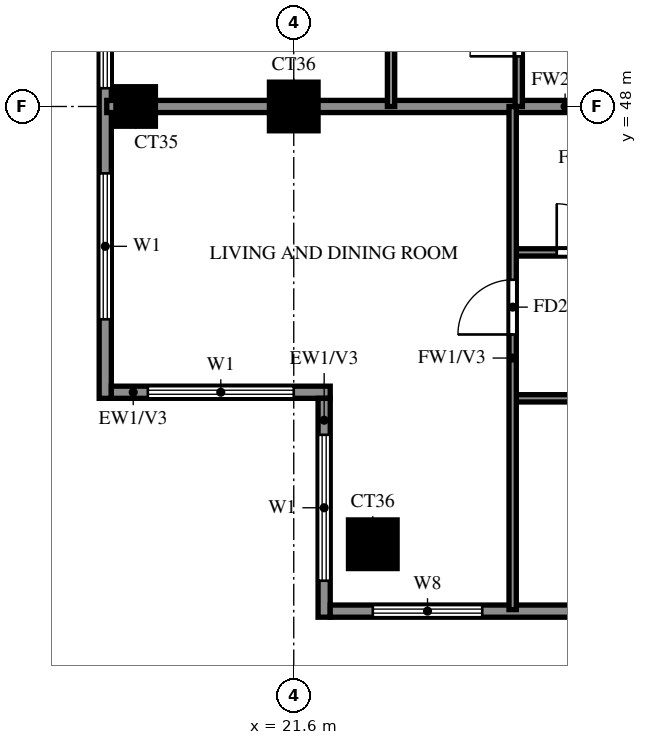
"""IFC4 building model, lengths in metres.
Left out: names, types, materials, properties, quantities, classifications, styles, units other than length and angle.
Written with IfcOpenShell. Run it as: python <this file> out.ifc"""

import sys

from ifc_helpers import new_model, si_unit, direction, frame, frame_2d, origin, origin_2d, place, context, subcontext, project, spatial, rectangle, extrude, source, transform, mapped, element, fill, save


model = new_model("IFC4")
c1 = context("Model", 3, precision=1e-05, world=origin(), true_north=direction((0.0, 1.0)))
c2 = subcontext(c1, "Body", "Model", "MODEL_VIEW")
j1 = project(units=[si_unit("LENGTHUNIT", "METRE"), si_unit("PLANEANGLEUNIT", "RADIAN")], contexts=[c1])
p1 = place(None, origin())
s1 = spatial("IfcSite", under=j1, at=p1, CompositionType="ELEMENT")
p2 = place(p1, origin())
s2 = spatial("IfcBuilding", under=s1, at=p2, CompositionType="ELEMENT")
p3 = place(p2, frame((0.0, 0.0, 243.0)))
s3 = spatial("IfcBuildingStorey", under=s2, at=p3, CompositionType="ELEMENT", Elevation=243.0)
m1 = source(origin(), c2, "Body", "SweptSolid", [
    extrude(rectangle(XDim=0.8, YDim=0.8, at=origin_2d()), origin(), (0.0, 0.0, 1.0), 3.22),
])
p4 = place(p3, frame((22.9, 40.8, 0.0), z_axis=(0.0, 0.0, 1.0), x_axis=(1.0, 0.0, 0.0)))
e1 = element("IfcColumn", 1, at=p4, inside=s3, PredefinedType="COLUMN", context=c2, shape_type="MappedRepresentation", body=[
    mapped(m1, transform((0.0, 0.0, 0.0))),
])
m2 = source(origin(), c2, "Body", "SweptSolid", [
    extrude(rectangle(XDim=0.65, YDim=0.65, at=origin_2d()), origin(), (0.0, 0.0, 1.0), 3.22),
])
p5 = place(p3, frame((19.0, 48.0, 0.0), z_axis=(0.0, 0.0, 1.0), x_axis=(1.0, 0.0, 0.0)))
e2 = element("IfcColumn", 2, at=p5, inside=s3, PredefinedType="COLUMN", context=c2, shape_type="MappedRepresentation", body=[
    mapped(m2, transform((0.0, 0.0, 0.0))),
])
p6 = place(p3, frame((21.6, 48.0, 0.0), z_axis=(0.0, 0.0, 1.0), x_axis=(1.0, 0.0, 0.0)))
e3 = element("IfcColumn", 3, at=p6, inside=s3, PredefinedType="COLUMN", context=c2, shape_type="MappedRepresentation", body=[
    mapped(m1, transform((0.0, 0.0, 0.0))),
])
p7 = place(p3, frame((18.5, 76.6, 0.0), z_axis=(0.0, 0.0, 1.0), x_axis=(0.0, -1.0, 0.0)))
e4 = element("IfcWall", 4, at=p7, inside=s3, PredefinedType="SOLIDWALL", context=c2, shape_type="SweptSolid", body=[
    extrude(rectangle(XDim=33.4, YDim=0.2, at=frame_2d((16.7, 0.0))), origin(), (0.0, 0.0, 1.0), 3.22),
])
p8 = place(p7, frame((7.9, 0.0, 0.0)))
e5 = element("IfcOpeningElement", 5, at=p8, cuts=e4, PredefinedType="OPENING", context=c2, shape_type="SweptSolid", body=[
    extrude(rectangle(XDim=1.8, YDim=2.4, at=frame_2d((0.9, 1.2))), frame((0.0, 0.11, 0.0), z_axis=(0.0, -1.0, 0.0), x_axis=(1.0, 0.0, 0.0)), (0.0, 0.0, 1.0), 0.22),
])
p9 = place(p7, frame((22.3, 0.0, 0.0)))
e6 = element("IfcOpeningElement", 6, at=p9, cuts=e4, PredefinedType="OPENING", context=c2, shape_type="SweptSolid", body=[
    extrude(rectangle(XDim=1.8, YDim=2.4, at=frame_2d((0.9, 1.2))), frame((0.0, 0.11, 0.0), z_axis=(0.0, -1.0, 0.0), x_axis=(1.0, 0.0, 0.0)), (0.0, 0.0, 1.0), 0.22),
])
p10 = place(p7, frame((29.7, 0.0, 0.6)))
e7 = element("IfcOpeningElement", 7, at=p10, cuts=e4, PredefinedType="OPENING", context=c2, shape_type="SweptSolid", body=[
    extrude(rectangle(XDim=2.4, YDim=2.4, at=frame_2d((1.2, 1.2))), frame((0.0, 0.11, 0.0), z_axis=(0.0, -1.0, 0.0), x_axis=(1.0, 0.0, 0.0)), (0.0, 0.0, 1.0), 0.22),
])
p11 = place(p7, frame((26.5, 0.0, 0.6)))
e8 = element("IfcOpeningElement", 8, at=p11, cuts=e4, PredefinedType="OPENING", context=c2, shape_type="SweptSolid", body=[
    extrude(rectangle(XDim=1.8, YDim=2.4, at=frame_2d((0.9, 1.2))), frame((0.0, 0.11, 0.0), z_axis=(0.0, -1.0, 0.0), x_axis=(1.0, 0.0, 0.0)), (0.0, 0.0, 1.0), 0.22),
])
p12 = place(p7, frame((17.95, 0.0, 0.6)))
e9 = element("IfcOpeningElement", 9, at=p12, cuts=e4, PredefinedType="OPENING", context=c2, shape_type="SweptSolid", body=[
    extrude(rectangle(XDim=0.9, YDim=2.4, at=frame_2d((0.45, 1.2))), frame((0.0, 0.11, 0.0), z_axis=(0.0, -1.0, 0.0), x_axis=(1.0, 0.0, 0.0)), (0.0, 0.0, 1.0), 0.22),
])
p13 = place(p7, frame((19.9, 0.0, 0.6)))
e10 = element("IfcOpeningElement", 10, at=p13, cuts=e4, PredefinedType="OPENING", context=c2, shape_type="SweptSolid", body=[
    extrude(rectangle(XDim=1.8, YDim=2.4, at=frame_2d((0.9, 1.2))), frame((0.0, 0.11, 0.0), z_axis=(0.0, -1.0, 0.0), x_axis=(1.0, 0.0, 0.0)), (0.0, 0.0, 1.0), 0.22),
])
p14 = place(p7, frame((14.8, 0.0, 0.6)))
e11 = element("IfcOpeningElement", 11, at=p14, cuts=e4, PredefinedType="OPENING", context=c2, shape_type="SweptSolid", body=[
    extrude(rectangle(XDim=2.4, YDim=2.4, at=frame_2d((1.2, 1.2))), frame((0.0, 0.11, 0.0), z_axis=(0.0, -1.0, 0.0), x_axis=(1.0, 0.0, 0.0)), (0.0, 0.0, 1.0), 0.22),
])
p15 = place(p7, frame((12.1, 0.0, 0.6)))
e12 = element("IfcOpeningElement", 12, at=p15, cuts=e4, PredefinedType="OPENING", context=c2, shape_type="SweptSolid", body=[
    extrude(rectangle(XDim=1.8, YDim=2.4, at=frame_2d((0.9, 1.2))), frame((0.0, 0.11, 0.0), z_axis=(0.0, -1.0, 0.0), x_axis=(1.0, 0.0, 0.0)), (0.0, 0.0, 1.0), 0.22),
])
p16 = place(p7, frame((3.55, 0.0, 1.5)))
e13 = element("IfcOpeningElement", 13, at=p16, cuts=e4, PredefinedType="OPENING", context=c2, shape_type="SweptSolid", body=[
    extrude(rectangle(XDim=0.9, YDim=0.9, at=frame_2d((0.45, 0.45))), frame((0.0, 0.11, 0.0), z_axis=(0.0, -1.0, 0.0), x_axis=(1.0, 0.0, 0.0)), (0.0, 0.0, 1.0), 0.22),
])
p17 = place(p7, frame((5.65, 0.0, 1.5)))
e14 = element("IfcOpeningElement", 14, at=p17, cuts=e4, PredefinedType="OPENING", context=c2, shape_type="SweptSolid", body=[
    extrude(rectangle(XDim=0.9, YDim=0.9, at=frame_2d((0.45, 0.45))), frame((0.0, 0.11, 0.0), z_axis=(0.0, -1.0, 0.0), x_axis=(1.0, 0.0, 0.0)), (0.0, 0.0, 1.0), 0.22),
])
p18 = place(p7, frame((0.6, 0.0, 0.6)))
e15 = element("IfcOpeningElement", 15, at=p18, cuts=e4, PredefinedType="OPENING", context=c2, shape_type="SweptSolid", body=[
    extrude(rectangle(XDim=2.4, YDim=2.4, at=frame_2d((1.2, 1.2))), frame((0.0, 0.11, 0.0), z_axis=(0.0, -1.0, 0.0), x_axis=(1.0, 0.0, 0.0)), (0.0, 0.0, 1.0), 0.22),
])
p19 = place(p3, frame((18.6, 43.3, 0.0), z_axis=(0.0, 0.0, 1.0), x_axis=(1.0, 0.0, 0.0)))
e16 = element("IfcWall", 16, at=p19, inside=s3, PredefinedType="SOLIDWALL", context=c2, shape_type="SweptSolid", body=[
    extrude(rectangle(XDim=3.6, YDim=0.2, at=frame_2d((1.8, 0.0))), origin(), (0.0, 0.0, 1.0), 3.22),
])
p20 = place(p19, frame((0.6, 0.0, 0.6)))
e17 = element("IfcOpeningElement", 17, at=p20, cuts=e16, PredefinedType="OPENING", context=c2, shape_type="SweptSolid", body=[
    extrude(rectangle(XDim=2.4, YDim=2.4, at=frame_2d((1.2, 1.2))), frame((0.0, 0.11, 0.0), z_axis=(0.0, -1.0, 0.0), x_axis=(1.0, 0.0, 0.0)), (0.0, 0.0, 1.0), 0.22),
])
p21 = place(p3, frame((22.1, 43.2, 0.0), z_axis=(0.0, 0.0, 1.0), x_axis=(0.0, -1.0, 0.0)))
e18 = element("IfcWall", 18, at=p21, inside=s3, PredefinedType="SOLIDWALL", context=c2, shape_type="SweptSolid", body=[
    extrude(rectangle(XDim=3.6, YDim=0.2, at=frame_2d((1.8, 0.0))), origin(), (0.0, 0.0, 1.0), 3.22),
])
p22 = place(p21, frame((0.6, 0.0, 0.6)))
e19 = element("IfcOpeningElement", 19, at=p22, cuts=e18, PredefinedType="OPENING", context=c2, shape_type="SweptSolid", body=[
    extrude(rectangle(XDim=2.4, YDim=2.4, at=frame_2d((1.2, 1.2))), frame((0.0, 0.11, 0.0), z_axis=(0.0, -1.0, 0.0), x_axis=(1.0, 0.0, 0.0)), (0.0, 0.0, 1.0), 0.22),
])
p23 = place(p3, frame((22.2, 39.7, 0.0), z_axis=(0.0, 0.0, 1.0), x_axis=(1.0, 0.0, 0.0)))
e20 = element("IfcWall", 20, at=p23, inside=s3, PredefinedType="SOLIDWALL", context=c2, shape_type="SweptSolid", body=[
    extrude(rectangle(XDim=19.8, YDim=0.2, at=frame_2d((9.9, 0.0))), origin(), (0.0, 0.0, 1.0), 3.22),
])
p24 = place(p23, frame((9.3, 0.0, 0.0)))
e21 = element("IfcOpeningElement", 21, at=p24, cuts=e20, PredefinedType="OPENING", context=c2, shape_type="SweptSolid", body=[
    extrude(rectangle(XDim=1.8, YDim=2.4, at=frame_2d((0.9, 1.2))), frame((0.0, 0.11, 0.0), z_axis=(0.0, -1.0, 0.0), x_axis=(1.0, 0.0, 0.0)), (0.0, 0.0, 1.0), 0.22),
])
p25 = place(p23, frame((0.7, 0.0, 0.6)))
e22 = element("IfcOpeningElement", 22, at=p25, cuts=e20, PredefinedType="OPENING", context=c2, shape_type="SweptSolid", body=[
    extrude(rectangle(XDim=1.8, YDim=2.4, at=frame_2d((0.9, 1.2))), frame((0.0, 0.11, 0.0), z_axis=(0.0, -1.0, 0.0), x_axis=(1.0, 0.0, 0.0)), (0.0, 0.0, 1.0), 0.22),
])
p26 = place(p23, frame((7.5, 0.0, 0.6)))
e23 = element("IfcOpeningElement", 23, at=p26, cuts=e20, PredefinedType="OPENING", context=c2, shape_type="SweptSolid", body=[
    extrude(rectangle(XDim=1.2, YDim=2.4, at=frame_2d((0.6, 1.2))), frame((0.0, 0.11, 0.0), z_axis=(0.0, -1.0, 0.0), x_axis=(1.0, 0.0, 0.0)), (0.0, 0.0, 1.0), 0.22),
])
p27 = place(p23, frame((4.35, 0.0, 1.5)))
e24 = element("IfcOpeningElement", 24, at=p27, cuts=e20, PredefinedType="OPENING", context=c2, shape_type="SweptSolid", body=[
    extrude(rectangle(XDim=0.9, YDim=0.9, at=frame_2d((0.45, 0.45))), frame((0.0, 0.11, 0.0), z_axis=(0.0, -1.0, 0.0), x_axis=(1.0, 0.0, 0.0)), (0.0, 0.0, 1.0), 0.22),
])
p28 = place(p3, frame((18.525, 48.0, 0.0), z_axis=(0.0, 0.0, 1.0), x_axis=(1.0, 0.0, 0.0)))
e25 = element("IfcWall", 25, at=p28, inside=s3, PredefinedType="SOLIDWALL", context=c2, shape_type="SweptSolid", body=[
    extrude(rectangle(XDim=15.075, YDim=0.2, at=frame_2d((7.538, 0.0))), origin(), (0.0, 0.0, 1.0), 3.22),
])
p29 = place(p3, frame((25.2, 43.2, 0.0), z_axis=(0.0, 0.0, 1.0), x_axis=(1.0, 0.0, 0.0)))
e26 = element("IfcWall", 26, at=p29, inside=s3, PredefinedType="PARTITIONING", context=c2, shape_type="SweptSolid", body=[
    extrude(rectangle(XDim=3.6, YDim=0.12, at=frame_2d((1.8, 0.0))), origin(), (0.0, 0.0, 1.0), 3.22),
])
p30 = place(p3, frame((25.2, 45.6, 0.0), z_axis=(0.0, 0.0, 1.0), x_axis=(1.0, 0.0, 0.0)))
e27 = element("IfcWall", 27, at=p30, inside=s3, PredefinedType="PARTITIONING", context=c2, shape_type="SweptSolid", body=[
    extrude(rectangle(XDim=6.0, YDim=0.12, at=frame_2d((3.0, 0.0))), origin(), (0.0, 0.0, 1.0), 3.22),
])
p31 = place(p30, frame((0.725, 0.0, 0.0)))
e28 = element("IfcOpeningElement", 28, at=p31, cuts=e27, PredefinedType="OPENING", context=c2, shape_type="SweptSolid", body=[
    extrude(rectangle(XDim=0.8, YDim=2.1, at=frame_2d((0.4, 1.05))), frame((0.0, 0.07, 0.0), z_axis=(0.0, -1.0, 0.0), x_axis=(1.0, 0.0, 0.0)), (0.0, 0.0, 1.0), 0.14),
])
p32 = place(p30, frame((3.675, 0.0, 0.0)))
e29 = element("IfcOpeningElement", 29, at=p32, cuts=e27, PredefinedType="OPENING", context=c2, shape_type="SweptSolid", body=[
    extrude(rectangle(XDim=0.9, YDim=2.1, at=frame_2d((0.45, 1.05))), frame((0.0, 0.07, 0.0), z_axis=(0.0, -1.0, 0.0), x_axis=(1.0, 0.0, 0.0)), (0.0, 0.0, 1.0), 0.14),
])
p33 = place(p3, frame((23.2, 48.0, 0.0), z_axis=(0.0, 0.0, 1.0), x_axis=(0.0, 1.0, 0.0)))
e30 = element("IfcWall", 30, at=p33, inside=s3, PredefinedType="PARTITIONING", context=c2, shape_type="SweptSolid", body=[
    extrude(rectangle(XDim=21.6, YDim=0.12, at=frame_2d((10.8, 0.0))), origin(), (0.0, 0.0, 1.0), 3.22),
])
p34 = place(p33, frame((1.35, 0.0, 0.0)))
e31 = element("IfcOpeningElement", 31, at=p34, cuts=e30, PredefinedType="OPENING", context=c2, shape_type="SweptSolid", body=[
    extrude(rectangle(XDim=0.9, YDim=2.1, at=frame_2d((0.45, 1.05))), frame((0.0, 0.07, 0.0), z_axis=(0.0, -1.0, 0.0), x_axis=(1.0, 0.0, 0.0)), (0.0, 0.0, 1.0), 0.14),
])
p35 = place(p33, frame((7.95, 0.0, 0.0)))
e32 = element("IfcOpeningElement", 32, at=p35, cuts=e30, PredefinedType="OPENING", context=c2, shape_type="SweptSolid", body=[
    extrude(rectangle(XDim=1.5, YDim=2.1, at=frame_2d((0.75, 1.05))), frame((0.0, 0.07, 0.0), z_axis=(0.0, -1.0, 0.0), x_axis=(1.0, 0.0, 0.0)), (0.0, 0.0, 1.0), 0.14),
])
p36 = place(p33, frame((12.15, 0.0, 0.0)))
e33 = element("IfcOpeningElement", 33, at=p36, cuts=e30, PredefinedType="OPENING", context=c2, shape_type="SweptSolid", body=[
    extrude(rectangle(XDim=0.9, YDim=2.1, at=frame_2d((0.45, 1.05))), frame((0.0, 0.07, 0.0), z_axis=(0.0, -1.0, 0.0), x_axis=(1.0, 0.0, 0.0)), (0.0, 0.0, 1.0), 0.14),
])
p37 = place(p33, frame((15.75, 0.0, 0.0)))
e34 = element("IfcOpeningElement", 34, at=p37, cuts=e30, PredefinedType="OPENING", context=c2, shape_type="SweptSolid", body=[
    extrude(rectangle(XDim=0.9, YDim=2.1, at=frame_2d((0.45, 1.05))), frame((0.0, 0.07, 0.0), z_axis=(0.0, -1.0, 0.0), x_axis=(1.0, 0.0, 0.0)), (0.0, 0.0, 1.0), 0.14),
])
p38 = place(p33, frame((19.35, 0.0, 0.0)))
e35 = element("IfcOpeningElement", 35, at=p38, cuts=e30, PredefinedType="OPENING", context=c2, shape_type="SweptSolid", body=[
    extrude(rectangle(XDim=0.9, YDim=2.1, at=frame_2d((0.45, 1.05))), frame((0.0, 0.07, 0.0), z_axis=(0.0, -1.0, 0.0), x_axis=(1.0, 0.0, 0.0)), (0.0, 0.0, 1.0), 0.14),
])
p39 = place(p3, frame((25.2, 39.725, 0.0), z_axis=(0.0, 0.0, 1.0), x_axis=(0.0, 1.0, 0.0)))
e36 = element("IfcWall", 36, at=p39, inside=s3, PredefinedType="PARTITIONING", context=c2, shape_type="SweptSolid", body=[
    extrude(rectangle(XDim=8.275, YDim=0.12, at=frame_2d((4.137, 0.0))), origin(), (0.0, 0.0, 1.0), 3.22),
])
p40 = place(p39, frame((4.525, 0.0, 0.0)))
e37 = element("IfcOpeningElement", 37, at=p40, cuts=e36, PredefinedType="OPENING", context=c2, shape_type="SweptSolid", body=[
    extrude(rectangle(XDim=0.9, YDim=2.1, at=frame_2d((0.45, 1.05))), frame((0.0, 0.07, 0.0), z_axis=(0.0, -1.0, 0.0), x_axis=(1.0, 0.0, 0.0)), (0.0, 0.0, 1.0), 0.14),
])
p41 = place(p3, frame((25.3, 48.0, 0.0), z_axis=(0.0, 0.0, 1.0), x_axis=(0.0, 1.0, 0.0)))
e38 = element("IfcWall", 38, at=p41, inside=s3, PredefinedType="PARTITIONING", context=c2, shape_type="SweptSolid", body=[
    extrude(rectangle(XDim=5.2, YDim=0.12, at=frame_2d((2.6, 0.0))), origin(), (0.0, 0.0, 1.0), 3.22),
])
p42 = place(p41, frame((0.825, 0.0, 0.0)))
e39 = element("IfcOpeningElement", 39, at=p42, cuts=e38, PredefinedType="OPENING", context=c2, shape_type="SweptSolid", body=[
    extrude(rectangle(XDim=0.8, YDim=2.1, at=frame_2d((0.4, 1.05))), frame((0.0, 0.07, 0.0), z_axis=(0.0, -1.0, 0.0), x_axis=(1.0, 0.0, 0.0)), (0.0, 0.0, 1.0), 0.14),
])
p43 = place(p10, origin())
e40 = element("IfcWindow", 40, at=p43, inside=s3, PartitioningType="DOUBLE_PANEL_VERTICAL", PredefinedType="WINDOW", context=c2, shape_type="SweptSolid", body=[
    extrude(rectangle(XDim=2.4, YDim=2.4, at=frame_2d((1.2, 1.2))), frame((0.0, 0.03, 0.0), z_axis=(0.0, -1.0, 0.0), x_axis=(1.0, 0.0, 0.0)), (0.0, 0.0, 1.0), 0.06),
])
fill(e7, e40)
p44 = place(p11, origin())
e41 = element("IfcWindow", 41, at=p44, inside=s3, PartitioningType="DOUBLE_PANEL_VERTICAL", PredefinedType="WINDOW", context=c2, shape_type="SweptSolid", body=[
    extrude(rectangle(XDim=1.8, YDim=2.4, at=frame_2d((0.9, 1.2))), frame((0.0, 0.03, 0.0), z_axis=(0.0, -1.0, 0.0), x_axis=(1.0, 0.0, 0.0)), (0.0, 0.0, 1.0), 0.06),
])
fill(e8, e41)
p45 = place(p20, origin())
e42 = element("IfcWindow", 42, at=p45, inside=s3, PartitioningType="DOUBLE_PANEL_VERTICAL", PredefinedType="WINDOW", context=c2, shape_type="SweptSolid", body=[
    extrude(rectangle(XDim=2.4, YDim=2.4, at=frame_2d((1.2, 1.2))), frame((0.0, 0.03, 0.0), z_axis=(0.0, -1.0, 0.0), x_axis=(1.0, 0.0, 0.0)), (0.0, 0.0, 1.0), 0.06),
])
fill(e17, e42)
p46 = place(p22, origin())
e43 = element("IfcWindow", 43, at=p46, inside=s3, PartitioningType="DOUBLE_PANEL_VERTICAL", PredefinedType="WINDOW", context=c2, shape_type="SweptSolid", body=[
    extrude(rectangle(XDim=2.4, YDim=2.4, at=frame_2d((1.2, 1.2))), frame((0.0, 0.03, 0.0), z_axis=(0.0, -1.0, 0.0), x_axis=(1.0, 0.0, 0.0)), (0.0, 0.0, 1.0), 0.06),
])
fill(e19, e43)
p47 = place(p25, origin())
e44 = element("IfcWindow", 44, at=p47, inside=s3, PartitioningType="DOUBLE_PANEL_VERTICAL", PredefinedType="WINDOW", context=c2, shape_type="SweptSolid", body=[
    extrude(rectangle(XDim=1.8, YDim=2.4, at=frame_2d((0.9, 1.2))), frame((0.0, 0.03, 0.0), z_axis=(0.0, -1.0, 0.0), x_axis=(1.0, 0.0, 0.0)), (0.0, 0.0, 1.0), 0.06),
])
fill(e22, e44)
p48 = place(p40, origin())
e45 = element("IfcDoor", 45, at=p48, inside=s3, OperationType="SINGLE_SWING_RIGHT", PredefinedType="DOOR", context=c2, shape_type="SweptSolid", body=[
    extrude(rectangle(XDim=0.9, YDim=2.1, at=frame_2d((0.45, 1.05))), frame((0.0, 0.025, 0.0), z_axis=(0.0, -1.0, 0.0), x_axis=(1.0, 0.0, 0.0)), (0.0, 0.0, 1.0), 0.05),
])
fill(e37, e45)
p49 = place(p31, origin())
e46 = element("IfcDoor", 46, at=p49, inside=s3, OperationType="SINGLE_SWING_RIGHT", PredefinedType="DOOR", context=c2, shape_type="SweptSolid", body=[
    extrude(rectangle(XDim=0.8, YDim=2.1, at=frame_2d((0.4, 1.05))), frame((0.0, 0.025, 0.0), z_axis=(0.0, -1.0, 0.0), x_axis=(1.0, 0.0, 0.0)), (0.0, 0.0, 1.0), 0.05),
])
fill(e28, e46)
p50 = place(p42, origin())
e47 = element("IfcDoor", 47, at=p50, inside=s3, OperationType="SINGLE_SWING_LEFT", PredefinedType="DOOR", context=c2, shape_type="SweptSolid", body=[
    extrude(rectangle(XDim=0.8, YDim=2.1, at=frame_2d((0.4, 1.05))), frame((0.0, 0.025, 0.0), z_axis=(0.0, -1.0, 0.0), x_axis=(1.0, 0.0, 0.0)), (0.0, 0.0, 1.0), 0.05),
])
fill(e39, e47)
save(model, sys.argv[1])
